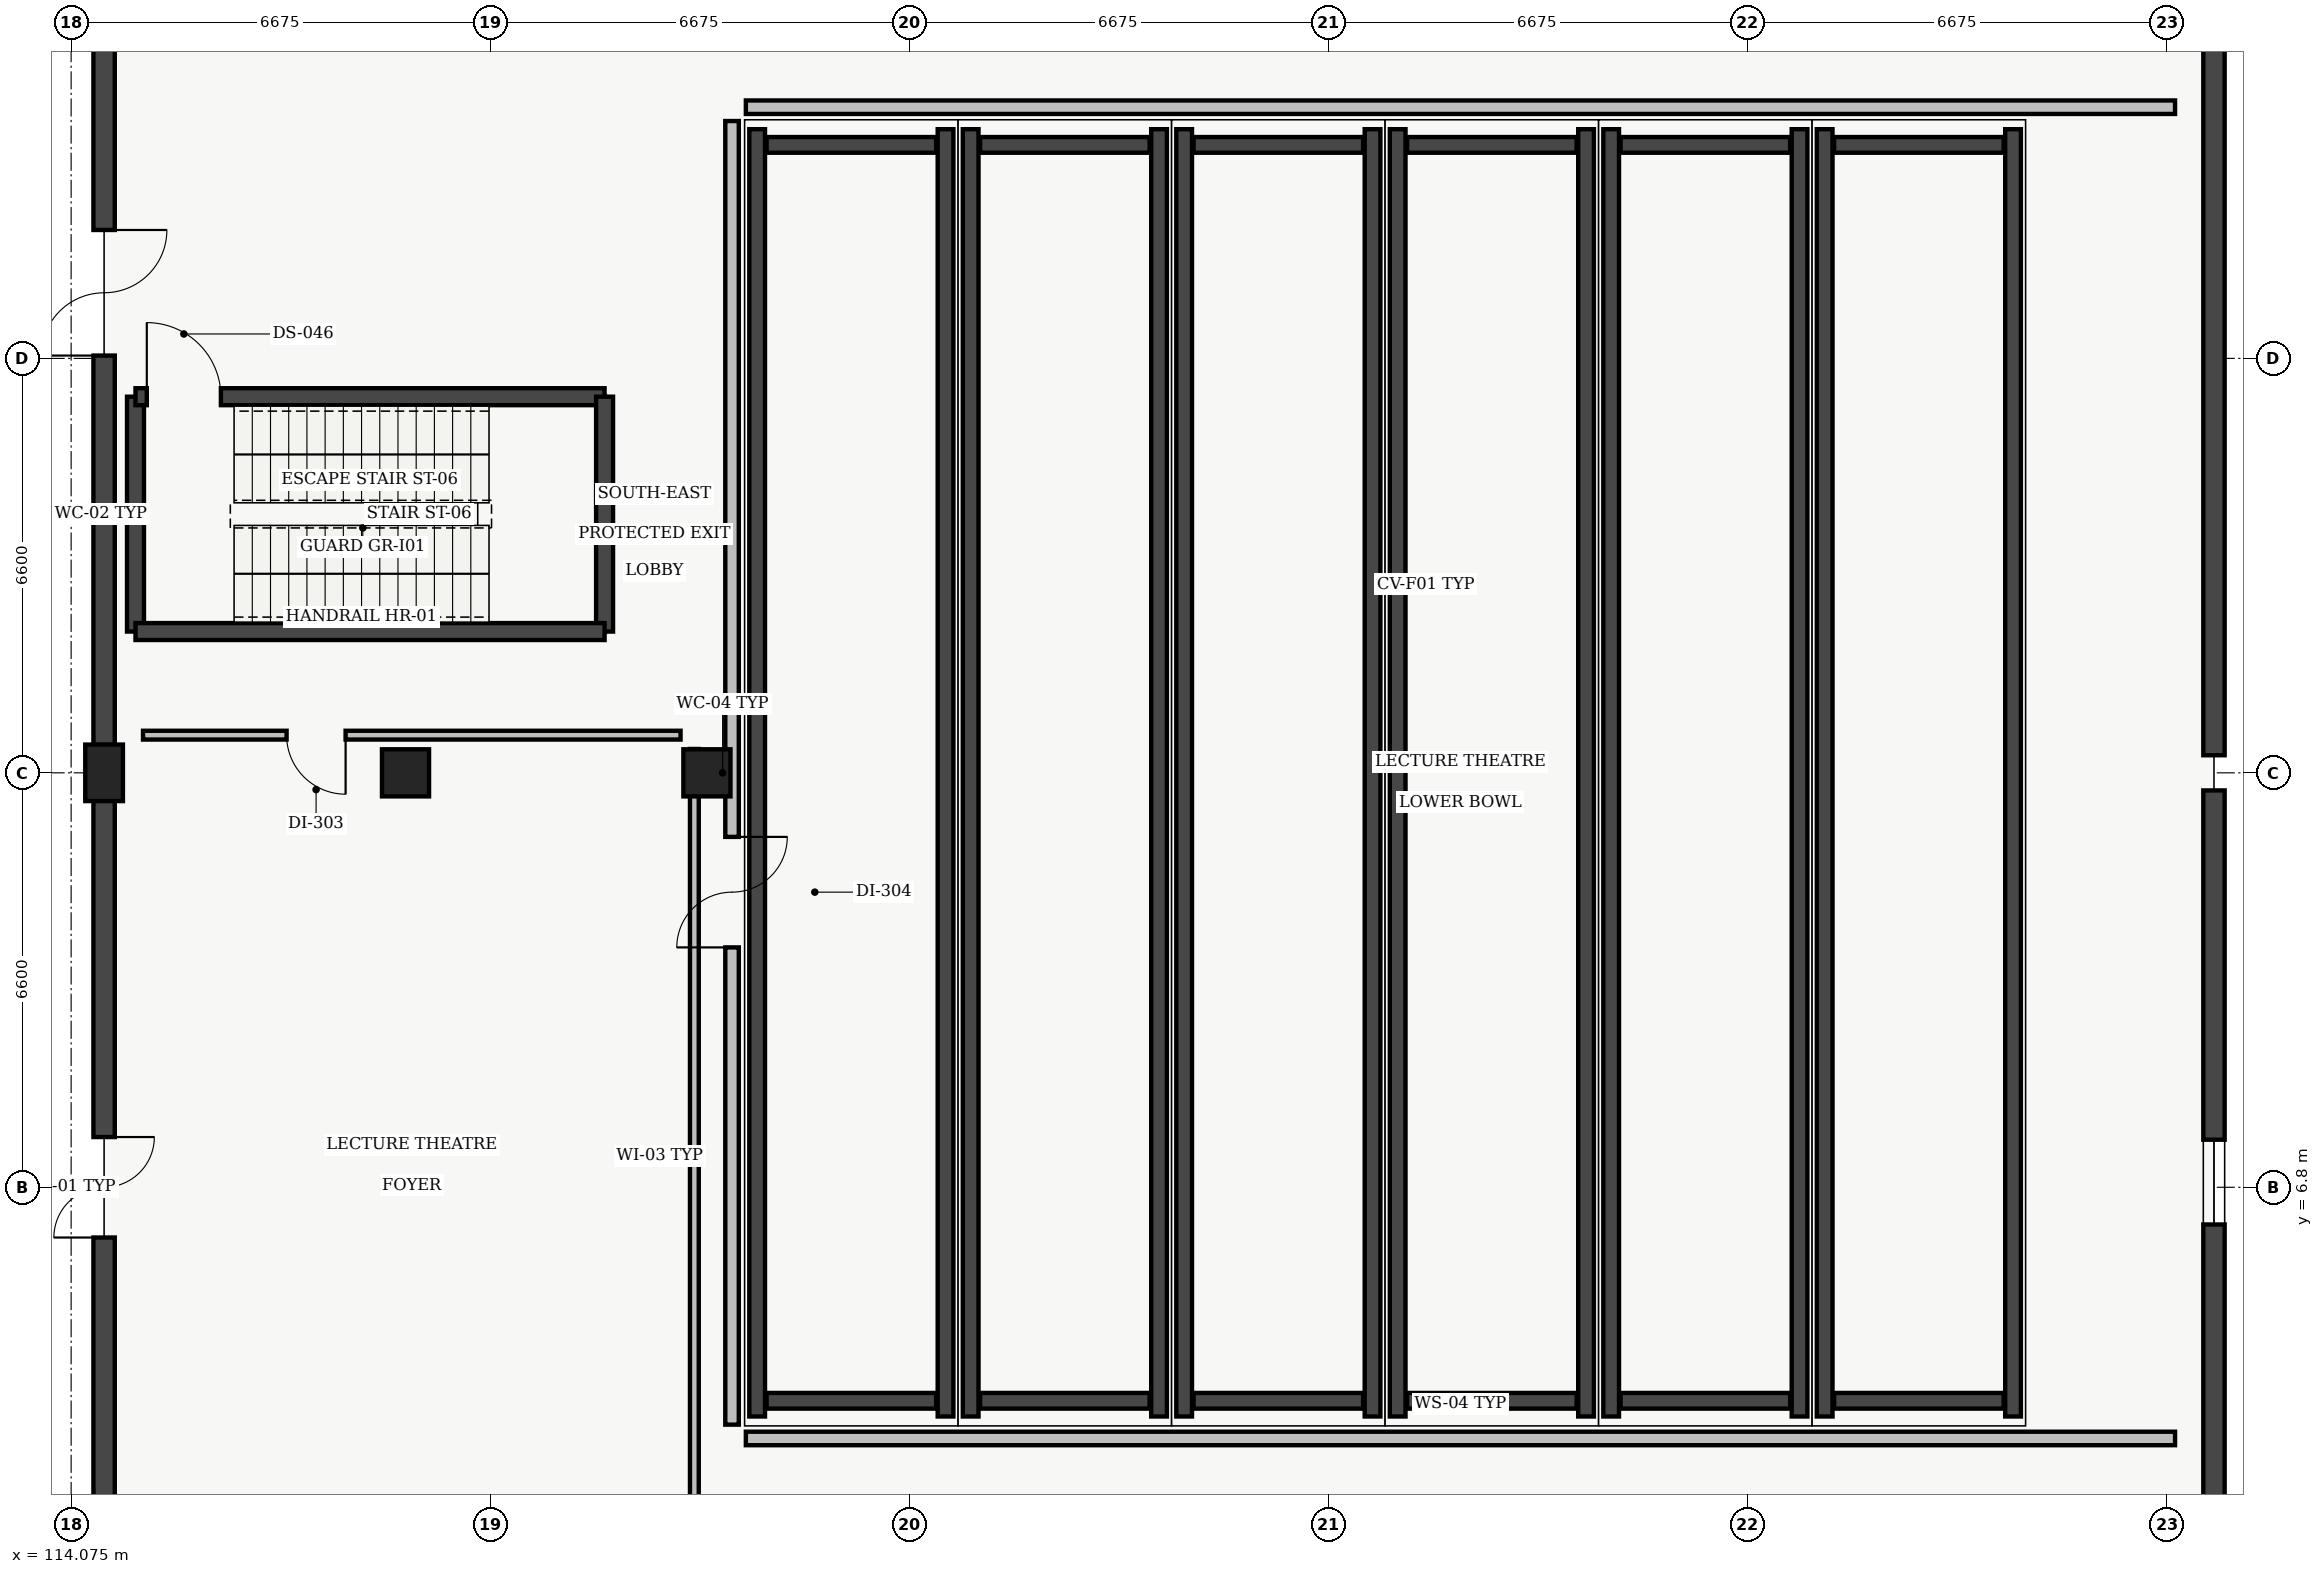
"""IFC4 building model, lengths in metres.
Left out: names, types, materials, properties, quantities, classifications, styles, units other than length and angle.
Written with IfcOpenShell. Run it as: python <this file> out.ifc"""

import sys

from ifc_helpers import new_model, si_unit, direction, frame, frame_2d, origin, origin_2d, place, context, subcontext, project, spatial, rectangle, circle, extrude, element, fill, save


model = new_model("IFC4")
c1 = context("Model", 3, precision=1e-05, world=origin(), true_north=direction((0.0, 1.0)))
c2 = subcontext(c1, "Body", "Model", "MODEL_VIEW")
j1 = project(units=[si_unit("LENGTHUNIT", "METRE"), si_unit("PLANEANGLEUNIT", "RADIAN")], contexts=[c1])
p1 = place(None, origin())
s1 = spatial("IfcSite", under=j1, at=p1, CompositionType="ELEMENT")
p2 = place(p1, origin())
s2 = spatial("IfcBuilding", under=s1, at=p2, CompositionType="ELEMENT")
p3 = place(p2, origin())
s3 = spatial("IfcBuildingStorey", under=s2, at=p3, CompositionType="ELEMENT", Elevation=0.0)
for number, where, z_axis, x_axis in (
    (1, (125.0, 3.15, 0.0), (0.0, 0.0, 1.0), (0.0, 1.0, 0.0)),
    (2, (128.0, 3.15, 0.0), (0.0, 0.0, 1.0), (0.0, 1.0, 0.0)),
):
    element("IfcWall", number, at=place(p3, frame(where, z_axis=z_axis, x_axis=x_axis)), inside=s3, PredefinedType="SHEAR", context=c2, shape_type="SweptSolid", body=[
        extrude(rectangle(XDim=20.5, YDim=0.25, at=frame_2d((10.25, 0.0))), origin(), (0.0, 0.0, 1.0), 0.315),
    ])
for number, where, z_axis, x_axis in (
    (3, (125.15, 3.4, 0.0), (0.0, 0.0, 1.0), (1.0, 0.0, 0.0)),
    (4, (125.15, 23.4, 0.0), (0.0, 0.0, 1.0), (1.0, 0.0, 0.0)),
):
    element("IfcWall", number, at=place(p3, frame(where, z_axis=z_axis, x_axis=x_axis)), inside=s3, PredefinedType="SHEAR", context=c2, shape_type="SweptSolid", body=[
        extrude(rectangle(XDim=2.7, YDim=0.25, at=frame_2d((1.35, 0.0))), origin(), (0.0, 0.0, 1.0), 0.315),
    ])
for number, where, z_axis, x_axis in (
    (5, (128.4, 3.15, 0.0), (0.0, 0.0, 1.0), (0.0, 1.0, 0.0)),
    (6, (131.4, 3.15, 0.0), (0.0, 0.0, 1.0), (0.0, 1.0, 0.0)),
):
    element("IfcWall", number, at=place(p3, frame(where, z_axis=z_axis, x_axis=x_axis)), inside=s3, PredefinedType="SHEAR", context=c2, shape_type="SweptSolid", body=[
        extrude(rectangle(XDim=20.5, YDim=0.25, at=frame_2d((10.25, 0.0))), origin(), (0.0, 0.0, 1.0), 0.795),
    ])
for number, where, z_axis, x_axis in (
    (7, (128.55, 3.4, 0.0), (0.0, 0.0, 1.0), (1.0, 0.0, 0.0)),
    (8, (128.55, 23.4, 0.0), (0.0, 0.0, 1.0), (1.0, 0.0, 0.0)),
):
    element("IfcWall", number, at=place(p3, frame(where, z_axis=z_axis, x_axis=x_axis)), inside=s3, PredefinedType="SHEAR", context=c2, shape_type="SweptSolid", body=[
        extrude(rectangle(XDim=2.7, YDim=0.25, at=frame_2d((1.35, 0.0))), origin(), (0.0, 0.0, 1.0), 0.795),
    ])
for number, where, z_axis, x_axis in (
    (9, (131.8, 3.15, 0.0), (0.0, 0.0, 1.0), (0.0, 1.0, 0.0)),
    (10, (134.8, 3.15, 0.0), (0.0, 0.0, 1.0), (0.0, 1.0, 0.0)),
):
    element("IfcWall", number, at=place(p3, frame(where, z_axis=z_axis, x_axis=x_axis)), inside=s3, PredefinedType="SHEAR", context=c2, shape_type="SweptSolid", body=[
        extrude(rectangle(XDim=20.5, YDim=0.25, at=frame_2d((10.25, 0.0))), origin(), (0.0, 0.0, 1.0), 1.275),
    ])
for number, where, z_axis, x_axis in (
    (11, (131.95, 3.4, 0.0), (0.0, 0.0, 1.0), (1.0, 0.0, 0.0)),
    (12, (131.95, 23.4, 0.0), (0.0, 0.0, 1.0), (1.0, 0.0, 0.0)),
):
    element("IfcWall", number, at=place(p3, frame(where, z_axis=z_axis, x_axis=x_axis)), inside=s3, PredefinedType="SHEAR", context=c2, shape_type="SweptSolid", body=[
        extrude(rectangle(XDim=2.7, YDim=0.25, at=frame_2d((1.35, 0.0))), origin(), (0.0, 0.0, 1.0), 1.275),
    ])
for number, where, z_axis, x_axis in (
    (13, (135.2, 3.15, 0.0), (0.0, 0.0, 1.0), (0.0, 1.0, 0.0)),
    (14, (138.2, 3.15, 0.0), (0.0, 0.0, 1.0), (0.0, 1.0, 0.0)),
):
    element("IfcWall", number, at=place(p3, frame(where, z_axis=z_axis, x_axis=x_axis)), inside=s3, PredefinedType="SHEAR", context=c2, shape_type="SweptSolid", body=[
        extrude(rectangle(XDim=20.5, YDim=0.25, at=frame_2d((10.25, 0.0))), origin(), (0.0, 0.0, 1.0), 1.755),
    ])
for number, where, z_axis, x_axis in (
    (15, (135.35, 3.4, 0.0), (0.0, 0.0, 1.0), (1.0, 0.0, 0.0)),
    (16, (135.35, 23.4, 0.0), (0.0, 0.0, 1.0), (1.0, 0.0, 0.0)),
):
    element("IfcWall", number, at=place(p3, frame(where, z_axis=z_axis, x_axis=x_axis)), inside=s3, PredefinedType="SHEAR", context=c2, shape_type="SweptSolid", body=[
        extrude(rectangle(XDim=2.7, YDim=0.25, at=frame_2d((1.35, 0.0))), origin(), (0.0, 0.0, 1.0), 1.755),
    ])
for number, where, z_axis, x_axis in (
    (17, (138.6, 3.15, 0.0), (0.0, 0.0, 1.0), (0.0, 1.0, 0.0)),
    (18, (141.6, 3.15, 0.0), (0.0, 0.0, 1.0), (0.0, 1.0, 0.0)),
):
    element("IfcWall", number, at=place(p3, frame(where, z_axis=z_axis, x_axis=x_axis)), inside=s3, PredefinedType="SHEAR", context=c2, shape_type="SweptSolid", body=[
        extrude(rectangle(XDim=20.5, YDim=0.25, at=frame_2d((10.25, 0.0))), origin(), (0.0, 0.0, 1.0), 2.235),
    ])
for number, where, z_axis, x_axis in (
    (19, (138.75, 3.4, 0.0), (0.0, 0.0, 1.0), (1.0, 0.0, 0.0)),
    (20, (138.75, 23.4, 0.0), (0.0, 0.0, 1.0), (1.0, 0.0, 0.0)),
):
    element("IfcWall", number, at=place(p3, frame(where, z_axis=z_axis, x_axis=x_axis)), inside=s3, PredefinedType="SHEAR", context=c2, shape_type="SweptSolid", body=[
        extrude(rectangle(XDim=2.7, YDim=0.25, at=frame_2d((1.35, 0.0))), origin(), (0.0, 0.0, 1.0), 2.235),
    ])
for number, where, z_axis, x_axis in (
    (21, (142.0, 3.15, 0.0), (0.0, 0.0, 1.0), (0.0, 1.0, 0.0)),
    (22, (145.0, 3.15, 0.0), (0.0, 0.0, 1.0), (0.0, 1.0, 0.0)),
):
    element("IfcWall", number, at=place(p3, frame(where, z_axis=z_axis, x_axis=x_axis)), inside=s3, PredefinedType="SHEAR", context=c2, shape_type="SweptSolid", body=[
        extrude(rectangle(XDim=20.5, YDim=0.25, at=frame_2d((10.25, 0.0))), origin(), (0.0, 0.0, 1.0), 2.715),
    ])
for number, where, z_axis, x_axis in (
    (23, (142.15, 3.4, 0.0), (0.0, 0.0, 1.0), (1.0, 0.0, 0.0)),
    (24, (142.15, 23.4, 0.0), (0.0, 0.0, 1.0), (1.0, 0.0, 0.0)),
):
    element("IfcWall", number, at=place(p3, frame(where, z_axis=z_axis, x_axis=x_axis)), inside=s3, PredefinedType="SHEAR", context=c2, shape_type="SweptSolid", body=[
        extrude(rectangle(XDim=2.7, YDim=0.25, at=frame_2d((1.35, 0.0))), origin(), (0.0, 0.0, 1.0), 2.715),
    ])
p4 = place(p3, frame((114.6, 13.4, 0.0), z_axis=(0.0, 0.0, 1.0), x_axis=(1.0, 0.0, 0.0)))
e25 = element("IfcColumn", 25, at=p4, inside=s3, PredefinedType="COLUMN", context=c2, shape_type="SweptSolid", body=[
    extrude(rectangle(XDim=0.6, YDim=0.9, at=origin_2d()), origin(), (0.0, 0.0, 1.0), 4.68),
])
for number, where, z_axis, x_axis in (
    (26, (119.4, 13.4, 0.0), (0.0, 0.0, 1.0), (1.0, 0.0, 0.0)),
    (27, (124.2, 13.4, 0.0), (0.0, 0.0, 1.0), (1.0, 0.0, 0.0)),
):
    element("IfcColumn", number, at=place(p3, frame(where, z_axis=z_axis, x_axis=x_axis)), inside=s3, PredefinedType="COLUMN", context=c2, shape_type="SweptSolid", body=[
        extrude(circle(Radius=0.375, at=origin_2d()), origin(), (0.0, 0.0, 1.0), 4.68),
    ])
p5 = place(p3, frame((114.6, 0.645, 0.0), z_axis=(0.0, 0.0, 1.0), x_axis=(0.0, 1.0, 0.0)))
e28 = element("IfcWall", 28, at=p5, inside=s3, PredefinedType="SOLIDWALL", context=c2, shape_type="SweptSolid", body=[
    extrude(rectangle(XDim=12.31, YDim=0.34, at=frame_2d((6.155, 0.0))), origin(), (0.0, 0.0, 1.0), 4.215),
])
p6 = place(p5, frame((5.355, 0.0, 0.0)))
e29 = element("IfcOpeningElement", 29, at=p6, cuts=e28, PredefinedType="OPENING", context=c2, shape_type="SweptSolid", body=[
    extrude(rectangle(XDim=1.6, YDim=2.2, at=frame_2d((0.8, 1.1))), frame((0.0, 0.17, 0.0), z_axis=(0.0, -1.0, 0.0), x_axis=(1.0, 0.0, 0.0)), (0.0, 0.0, 1.0), 0.34),
])
p7 = place(p3, frame((114.6, 13.845, 0.0), z_axis=(0.0, 0.0, 1.0), x_axis=(0.0, 1.0, 0.0)))
e30 = element("IfcWall", 30, at=p7, inside=s3, PredefinedType="SOLIDWALL", context=c2, shape_type="SweptSolid", body=[
    extrude(rectangle(XDim=12.31, YDim=0.34, at=frame_2d((6.155, 0.0))), origin(), (0.0, 0.0, 1.0), 4.215),
])
p8 = place(p7, frame((6.2, 0.0, 0.0)))
e31 = element("IfcOpeningElement", 31, at=p8, cuts=e30, PredefinedType="OPENING", context=c2, shape_type="SweptSolid", body=[
    extrude(rectangle(XDim=2.0, YDim=2.25, at=frame_2d((1.0, 1.125))), frame((0.0, 0.17, 0.0), z_axis=(0.0, -1.0, 0.0), x_axis=(1.0, 0.0, 0.0)), (0.0, 0.0, 1.0), 0.34),
])
p9 = place(p3, frame((148.2, 26.155, 0.0), z_axis=(0.0, 0.0, 1.0), x_axis=(0.0, -1.0, 0.0)))
e32 = element("IfcWall", 32, at=p9, inside=s3, PredefinedType="SOLIDWALL", context=c2, shape_type="SweptSolid", body=[
    extrude(rectangle(XDim=12.475, YDim=0.34, at=frame_2d((6.238, 0.0))), origin(), (0.0, 0.0, 1.0), 4.88),
])
p10 = place(p3, frame((148.2, 13.12, 0.0), z_axis=(0.0, 0.0, 1.0), x_axis=(0.0, -1.0, 0.0)))
e33 = element("IfcWall", 33, at=p10, inside=s3, PredefinedType="SOLIDWALL", context=c2, shape_type="SweptSolid", body=[
    extrude(rectangle(XDim=12.475, YDim=0.34, at=frame_2d((6.238, 0.0))), origin(), (0.0, 0.0, 1.0), 4.88),
])
p11 = place(p10, frame((5.562, 0.0, 0.95)))
e34 = element("IfcOpeningElement", 34, at=p11, cuts=e33, PredefinedType="OPENING", context=c2, shape_type="SweptSolid", body=[
    extrude(rectangle(XDim=1.35, YDim=1.8, at=frame_2d((0.675, 0.9))), frame((0.0, 0.17, 0.0), z_axis=(0.0, -1.0, 0.0), x_axis=(1.0, 0.0, 0.0)), (0.0, 0.0, 1.0), 0.34),
])
p12 = place(p3, frame((115.1, 15.65, 0.0), z_axis=(0.0, 0.0, 1.0), x_axis=(0.0, 1.0, 0.0)))
e35 = element("IfcWall", 35, at=p12, inside=s3, PredefinedType="SHEAR", context=c2, shape_type="SweptSolid", body=[
    extrude(rectangle(XDim=3.74, YDim=0.27, at=frame_2d((1.87, 0.0))), origin(), (0.0, 0.0, 1.0), 4.88),
])
p13 = place(p3, frame((115.1, 19.39, 0.0), z_axis=(0.0, 0.0, 1.0), x_axis=(1.0, 0.0, 0.0)))
e36 = element("IfcWall", 36, at=p13, inside=s3, PredefinedType="SHEAR", context=c2, shape_type="SweptSolid", body=[
    extrude(rectangle(XDim=7.47, YDim=0.27, at=frame_2d((3.735, 0.0))), origin(), (0.0, 0.0, 1.0), 4.88),
])
p14 = place(p13, frame((0.18, 0.0, 0.0)))
e37 = element("IfcOpeningElement", 37, at=p14, cuts=e36, PredefinedType="OPENING", context=c2, shape_type="SweptSolid", body=[
    extrude(rectangle(XDim=1.18, YDim=2.15, at=frame_2d((0.59, 1.075))), frame((0.0, 0.135, 0.0), z_axis=(0.0, -1.0, 0.0), x_axis=(1.0, 0.0, 0.0)), (0.0, 0.0, 1.0), 0.27),
])
p15 = place(p3, frame((122.57, 19.39, 0.0), z_axis=(0.0, 0.0, 1.0), x_axis=(0.0, -1.0, 0.0)))
e38 = element("IfcWall", 38, at=p15, inside=s3, PredefinedType="SHEAR", context=c2, shape_type="SweptSolid", body=[
    extrude(rectangle(XDim=3.74, YDim=0.27, at=frame_2d((1.87, 0.0))), origin(), (0.0, 0.0, 1.0), 4.88),
])
p16 = place(p3, frame((122.57, 15.65, 0.0), z_axis=(0.0, 0.0, 1.0), x_axis=(-1.0, 0.0, 0.0)))
e39 = element("IfcWall", 39, at=p16, inside=s3, PredefinedType="SHEAR", context=c2, shape_type="SweptSolid", body=[
    extrude(rectangle(XDim=7.47, YDim=0.27, at=frame_2d((3.735, 0.0))), origin(), (0.0, 0.0, 1.0), 4.88),
])
p17 = place(p3, frame((124.0, 0.82, 0.0), z_axis=(0.0, 0.0, 1.0), x_axis=(0.0, 1.0, 0.0)))
e40 = element("IfcWall", 40, at=p17, inside=s3, PredefinedType="PARTITIONING", context=c2, shape_type="SweptSolid", body=[
    extrude(rectangle(XDim=12.96, YDim=0.14, at=frame_2d((6.48, 0.0))), origin(), (0.0, 0.0, 1.0), 4.55),
])
p18 = place(p3, frame((123.78, 14.0, 0.0), z_axis=(0.0, 0.0, 1.0), x_axis=(-1.0, 0.0, 0.0)))
e41 = element("IfcWall", 41, at=p18, inside=s3, PredefinedType="PARTITIONING", context=c2, shape_type="SweptSolid", body=[
    extrude(rectangle(XDim=8.56, YDim=0.14, at=frame_2d((4.28, 0.0))), origin(), (0.0, 0.0, 1.0), 4.55),
])
p19 = place(p18, frame((5.334, 0.0, 0.0)))
e42 = element("IfcOpeningElement", 42, at=p19, cuts=e41, PredefinedType="OPENING", context=c2, shape_type="SweptSolid", body=[
    extrude(rectangle(XDim=0.94, YDim=2.12, at=frame_2d((0.47, 1.06))), frame((0.0, 0.07, 0.0), z_axis=(0.0, -1.0, 0.0), x_axis=(1.0, 0.0, 0.0)), (0.0, 0.0, 1.0), 0.14),
])
for number, where, z_axis, x_axis in (
    (43, (124.82, 2.8, 0.0), (0.0, 0.0, 1.0), (1.0, 0.0, 0.0)),
    (44, (147.58, 24.0, 0.0), (0.0, 0.0, 1.0), (-1.0, 0.0, 0.0)),
):
    element("IfcWall", number, at=place(p3, frame(where, z_axis=z_axis, x_axis=x_axis)), inside=s3, PredefinedType="SOLIDWALL", context=c2, shape_type="SweptSolid", body=[
        extrude(rectangle(XDim=22.76, YDim=0.215, at=frame_2d((11.38, 0.0))), origin(), (0.0, 0.0, 1.0), 4.55),
    ])
p20 = place(p3, frame((124.6, 23.78, 0.0), z_axis=(0.0, 0.0, 1.0), x_axis=(0.0, -1.0, 0.0)))
e45 = element("IfcWall", 45, at=p20, inside=s3, PredefinedType="SOLIDWALL", context=c2, shape_type="SweptSolid", body=[
    extrude(rectangle(XDim=20.76, YDim=0.215, at=frame_2d((10.38, 0.0))), origin(), (0.0, 0.0, 1.0), 4.55),
])
p21 = place(p20, frame((11.4, 0.0, 0.0)))
e46 = element("IfcOpeningElement", 46, at=p21, cuts=e45, PredefinedType="OPENING", context=c2, shape_type="SweptSolid", body=[
    extrude(rectangle(XDim=1.76, YDim=2.25, at=frame_2d((0.88, 1.125))), frame((0.0, 0.107, 0.0), z_axis=(0.0, -1.0, 0.0), x_axis=(1.0, 0.0, 0.0)), (0.0, 0.0, 1.0), 0.215),
])
p22 = place(p6, origin())
e47 = element("IfcDoor", 47, at=p22, inside=s3, OperationType="DOUBLE_DOOR_SINGLE_SWING", PredefinedType="DOOR", context=c2, shape_type="SweptSolid", body=[
    extrude(rectangle(XDim=1.6, YDim=2.2, at=frame_2d((0.8, 1.1))), frame((0.0, 0.025, 0.0), z_axis=(0.0, -1.0, 0.0), x_axis=(1.0, 0.0, 0.0)), (0.0, 0.0, 1.0), 0.05),
])
fill(e29, e47)
p23 = place(p8, origin())
e48 = element("IfcDoor", 48, at=p23, inside=s3, OperationType="DOUBLE_DOOR_SINGLE_SWING", PredefinedType="DOOR", context=c2, shape_type="SweptSolid", body=[
    extrude(rectangle(XDim=2.0, YDim=2.25, at=frame_2d((1.0, 1.125))), frame((0.0, 0.025, 0.0), z_axis=(0.0, -1.0, 0.0), x_axis=(1.0, 0.0, 0.0)), (0.0, 0.0, 1.0), 0.05),
])
fill(e31, e48)
p24 = place(p11, origin())
e49 = element("IfcWindow", 49, at=p24, inside=s3, PartitioningType="SINGLE_PANEL", PredefinedType="WINDOW", context=c2, shape_type="SweptSolid", body=[
    extrude(rectangle(XDim=1.35, YDim=1.8, at=frame_2d((0.675, 0.9))), frame((0.0, 0.03, 0.0), z_axis=(0.0, -1.0, 0.0), x_axis=(1.0, 0.0, 0.0)), (0.0, 0.0, 1.0), 0.06),
])
fill(e34, e49)
p25 = place(p14, origin())
e50 = element("IfcDoor", 50, at=p25, inside=s3, OperationType="SINGLE_SWING_LEFT", PredefinedType="DOOR", context=c2, shape_type="SweptSolid", body=[
    extrude(rectangle(XDim=1.18, YDim=2.15, at=frame_2d((0.59, 1.075))), frame((0.0, 0.025, 0.0), z_axis=(0.0, -1.0, 0.0), x_axis=(1.0, 0.0, 0.0)), (0.0, 0.0, 1.0), 0.05),
])
fill(e37, e50)
p26 = place(p19, origin())
e51 = element("IfcDoor", 51, at=p26, inside=s3, OperationType="SINGLE_SWING_LEFT", PredefinedType="DOOR", context=c2, shape_type="SweptSolid", body=[
    extrude(rectangle(XDim=0.94, YDim=2.12, at=frame_2d((0.47, 1.06))), frame((0.0, 0.025, 0.0), z_axis=(0.0, -1.0, 0.0), x_axis=(1.0, 0.0, 0.0)), (0.0, 0.0, 1.0), 0.05),
])
fill(e42, e51)
p27 = place(p21, origin())
e52 = element("IfcDoor", 52, at=p27, inside=s3, OperationType="DOUBLE_DOOR_SINGLE_SWING", PredefinedType="DOOR", context=c2, shape_type="SweptSolid", body=[
    extrude(rectangle(XDim=1.76, YDim=2.25, at=frame_2d((0.88, 1.125))), frame((0.0, 0.025, 0.0), z_axis=(0.0, -1.0, 0.0), x_axis=(1.0, 0.0, 0.0)), (0.0, 0.0, 1.0), 0.05),
])
fill(e46, e52)
save(model, sys.argv[1])
